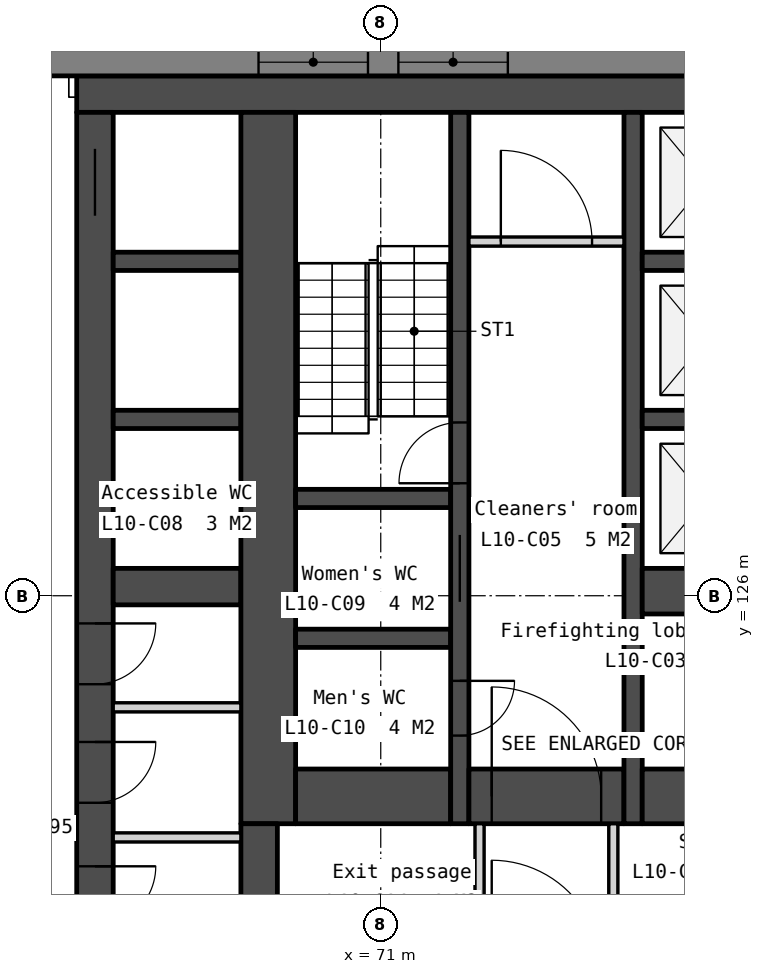
"""IFC4 building model, lengths in metres.
Left out: names, types, materials, properties, quantities, classifications, styles, units other than length and angle.
Written with IfcOpenShell. Run it as: python <this file> out.ifc"""

import sys

from ifc_helpers import new_model, si_unit, direction, frame, frame_2d, origin, place, context, subcontext, project, spatial, polyline, rectangle, outline, extrude, element, fill, save


model = new_model("IFC4")
c1 = context("Model", 3, precision=1e-05, world=origin(), true_north=direction((0.0, 1.0)))
c2 = subcontext(c1, "Body", "Model", "MODEL_VIEW")
j1 = project(units=[si_unit("LENGTHUNIT", "METRE"), si_unit("PLANEANGLEUNIT", "RADIAN")], contexts=[c1])
p1 = place(None, origin())
s1 = spatial("IfcSite", under=j1, at=p1, CompositionType="ELEMENT")
p2 = place(p1, origin())
s2 = spatial("IfcBuilding", under=s1, at=p2, CompositionType="ELEMENT")
p3 = place(p2, frame((0.0, 0.0, 49.0)))
s3 = spatial("IfcBuildingStorey", under=s2, at=p3, CompositionType="ELEMENT", Elevation=49.0)
p4 = place(p3, frame((66.0, 134.25, 0.0), z_axis=(0.0, 0.0, 1.0), x_axis=(1.0, 0.0, 0.0)))
e1 = element("IfcWall", 1, at=p4, inside=s3, PredefinedType="SOLIDWALL", context=c2, shape_type="SweptSolid", body=[
    extrude(rectangle(XDim=28.0, YDim=0.6, at=frame_2d((14.0, 0.0))), origin(), (0.0, 0.0, 1.0), 3.35),
])
p5 = place(p3, frame((66.3, 133.95, 0.0), z_axis=(0.0, 0.0, 1.0), x_axis=(0.0, -1.0, 0.0)))
e2 = element("IfcWall", 2, at=p5, inside=s3, PredefinedType="SOLIDWALL", context=c2, shape_type="SweptSolid", body=[
    extrude(rectangle(XDim=13.8, YDim=0.6, at=frame_2d((6.9, 0.0))), origin(), (0.0, 0.0, 1.0), 3.35),
])
p6 = place(p5, frame((0.6, 0.0, 0.0)))
e3 = element("IfcOpeningElement", 3, at=p6, cuts=e2, PredefinedType="OPENING", context=c2, shape_type="SweptSolid", body=[
    extrude(rectangle(XDim=1.1, YDim=2.1, at=frame_2d((0.55, 1.05))), frame((0.0, 0.31, 0.0), z_axis=(0.0, -1.0, 0.0), x_axis=(1.0, 0.0, 0.0)), (0.0, 0.0, 1.0), 0.62),
])
p7 = place(p5, frame((8.405, 0.0, 0.0)))
e4 = element("IfcOpeningElement", 4, at=p7, cuts=e2, PredefinedType="OPENING", context=c2, shape_type="SweptSolid", body=[
    extrude(rectangle(XDim=1.0, YDim=2.1, at=frame_2d((0.5, 1.05))), frame((0.0, 0.31, 0.0), z_axis=(0.0, -1.0, 0.0), x_axis=(1.0, 0.0, 0.0)), (0.0, 0.0, 1.0), 0.62),
])
p8 = place(p5, frame((10.355, 0.0, 0.0)))
e5 = element("IfcOpeningElement", 5, at=p8, cuts=e2, PredefinedType="OPENING", context=c2, shape_type="SweptSolid", body=[
    extrude(rectangle(XDim=1.0, YDim=2.1, at=frame_2d((0.5, 1.05))), frame((0.0, 0.31, 0.0), z_axis=(0.0, -1.0, 0.0), x_axis=(1.0, 0.0, 0.0)), (0.0, 0.0, 1.0), 0.62),
])
p9 = place(p5, frame((12.4, 0.0, 0.0)))
e6 = element("IfcOpeningElement", 6, at=p9, cuts=e2, PredefinedType="OPENING", context=c2, shape_type="SweptSolid", body=[
    extrude(rectangle(XDim=1.0, YDim=2.1, at=frame_2d((0.5, 1.05))), frame((0.0, 0.31, 0.0), z_axis=(0.0, -1.0, 0.0), x_axis=(1.0, 0.0, 0.0)), (0.0, 0.0, 1.0), 0.62),
])
for number, where, z_axis, x_axis in (
    (7, (66.6, 131.5, 0.0), (0.0, 0.0, 1.0), (1.0, 0.0, 0.0)),
    (8, (66.6, 128.9, 0.0), (0.0, 0.0, 1.0), (1.0, 0.0, 0.0)),
):
    element("IfcWall", number, at=place(p3, frame(where, z_axis=z_axis, x_axis=x_axis)), inside=s3, PredefinedType="SOLIDWALL", context=c2, shape_type="SweptSolid", body=[
        extrude(rectangle(XDim=2.1, YDim=0.3, at=frame_2d((1.05, 0.0))), origin(), (0.0, 0.0, 1.0), 3.35),
    ])
p10 = place(p3, frame((66.6, 126.15, 0.0), z_axis=(0.0, 0.0, 1.0), x_axis=(1.0, 0.0, 0.0)))
e9 = element("IfcWall", 9, at=p10, inside=s3, PredefinedType="SOLIDWALL", context=c2, shape_type="SweptSolid", body=[
    extrude(rectangle(XDim=2.1, YDim=0.6, at=frame_2d((1.05, 0.0))), origin(), (0.0, 0.0, 1.0), 3.35),
])
for number, where, z_axis, x_axis in (
    (10, (66.6, 124.165, 0.0), (0.0, 0.0, 1.0), (1.0, 0.0, 0.0)),
    (11, (66.6, 122.025, 0.0), (0.0, 0.0, 1.0), (1.0, 0.0, 0.0)),
):
    element("IfcWall", number, at=place(p3, frame(where, z_axis=z_axis, x_axis=x_axis)), inside=s3, PredefinedType="PARTITIONING", context=c2, shape_type="SweptSolid", body=[
        extrude(rectangle(XDim=2.1, YDim=0.15, at=frame_2d((1.05, 0.0))), origin(), (0.0, 0.0, 1.0), 3.35),
    ])
p11 = place(p3, frame((69.15, 133.95, 0.0), z_axis=(0.0, 0.0, 1.0), x_axis=(0.0, -1.0, 0.0)))
e12 = element("IfcWall", 12, at=p11, inside=s3, PredefinedType="SOLIDWALL", context=c2, shape_type="SweptSolid", body=[
    extrude(rectangle(XDim=11.7, YDim=0.9, at=frame_2d((5.85, 0.0))), origin(), (0.0, 0.0, 1.0), 3.35),
])
p12 = place(p3, frame((69.0, 122.25, 0.0), z_axis=(0.0, 0.0, 1.0), x_axis=(0.0, -1.0, 0.0)))
e13 = element("IfcWall", 13, at=p12, inside=s3, PredefinedType="SOLIDWALL", context=c2, shape_type="SweptSolid", body=[
    extrude(rectangle(XDim=2.1, YDim=0.6, at=frame_2d((1.05, 0.0))), origin(), (0.0, 0.0, 1.0), 3.35),
])
for number, where, z_axis, x_axis in (
    (14, (69.6, 127.6, 0.0), (0.0, 0.0, 1.0), (1.0, 0.0, 0.0)),
    (15, (69.6, 125.3, 0.0), (0.0, 0.0, 1.0), (1.0, 0.0, 0.0)),
):
    element("IfcWall", number, at=place(p3, frame(where, z_axis=z_axis, x_axis=x_axis)), inside=s3, PredefinedType="SOLIDWALL", context=c2, shape_type="SweptSolid", body=[
        extrude(rectangle(XDim=2.55, YDim=0.3, at=frame_2d((1.275, 0.0))), origin(), (0.0, 0.0, 1.0), 3.35),
    ])
p13 = place(p3, frame((69.6, 122.7, 0.0), z_axis=(0.0, 0.0, 1.0), x_axis=(1.0, 0.0, 0.0)))
e16 = element("IfcWall", 16, at=p13, inside=s3, PredefinedType="SOLIDWALL", context=c2, shape_type="SweptSolid", body=[
    extrude(rectangle(XDim=2.55, YDim=0.9, at=frame_2d((1.275, 0.0))), origin(), (0.0, 0.0, 1.0), 3.35),
])
p14 = place(p3, frame((72.3, 133.95, 0.0), z_axis=(0.0, 0.0, 1.0), x_axis=(0.0, -1.0, 0.0)))
e17 = element("IfcWall", 17, at=p14, inside=s3, PredefinedType="SOLIDWALL", context=c2, shape_type="SweptSolid", body=[
    extrude(rectangle(XDim=11.7, YDim=0.3, at=frame_2d((5.85, 0.0))), origin(), (0.0, 0.0, 1.0), 3.35),
])
p15 = place(p14, frame((6.95, 0.0, 0.0)))
e18 = element("IfcOpeningElement", 18, at=p15, cuts=e17, PredefinedType="OPENING", context=c2, shape_type="SweptSolid", body=[
    extrude(rectangle(XDim=1.1, YDim=2.1, at=frame_2d((0.55, 1.05))), frame((0.0, 0.16, 0.0), z_axis=(0.0, -1.0, 0.0), x_axis=(1.0, 0.0, 0.0)), (0.0, 0.0, 1.0), 0.32),
])
p16 = place(p14, frame((9.35, 0.0, 0.0)))
e19 = element("IfcOpeningElement", 19, at=p16, cuts=e17, PredefinedType="OPENING", context=c2, shape_type="SweptSolid", body=[
    extrude(rectangle(XDim=0.9, YDim=2.1, at=frame_2d((0.45, 1.05))), frame((0.0, 0.16, 0.0), z_axis=(0.0, -1.0, 0.0), x_axis=(1.0, 0.0, 0.0)), (0.0, 0.0, 1.0), 0.32),
])
p17 = place(p14, frame((5.1, 0.0, 0.0)))
e20 = element("IfcOpeningElement", 20, at=p17, cuts=e17, PredefinedType="OPENING", context=c2, shape_type="SweptSolid", body=[
    extrude(rectangle(XDim=1.0, YDim=2.1, at=frame_2d((0.5, 1.05))), frame((0.0, 0.16, 0.0), z_axis=(0.0, -1.0, 0.0), x_axis=(1.0, 0.0, 0.0)), (0.0, 0.0, 1.0), 0.32),
])
p18 = place(p3, frame((72.45, 131.825, 0.0), z_axis=(0.0, 0.0, 1.0), x_axis=(1.0, 0.0, 0.0)))
e21 = element("IfcWall", 21, at=p18, inside=s3, PredefinedType="PARTITIONING", context=c2, shape_type="SweptSolid", body=[
    extrude(rectangle(XDim=2.55, YDim=0.15, at=frame_2d((1.275, 0.0))), origin(), (0.0, 0.0, 1.0), 3.35),
])
p19 = place(p18, frame((0.525, 0.0, 0.0)))
e22 = element("IfcOpeningElement", 22, at=p19, cuts=e21, PredefinedType="OPENING", context=c2, shape_type="SweptSolid", body=[
    extrude(rectangle(XDim=1.5, YDim=2.1, at=frame_2d((0.75, 1.05))), frame((0.0, 0.085, 0.0), z_axis=(0.0, -1.0, 0.0), x_axis=(1.0, 0.0, 0.0)), (0.0, 0.0, 1.0), 0.17),
])
p20 = place(p3, frame((72.45, 122.7, 0.0), z_axis=(0.0, 0.0, 1.0), x_axis=(1.0, 0.0, 0.0)))
e23 = element("IfcWall", 23, at=p20, inside=s3, PredefinedType="SOLIDWALL", context=c2, shape_type="SweptSolid", body=[
    extrude(rectangle(XDim=2.55, YDim=0.9, at=frame_2d((1.275, 0.0))), origin(), (0.0, 0.0, 1.0), 3.35),
])
p21 = place(p20, frame((0.375, 0.0, 0.0)))
e24 = element("IfcOpeningElement", 24, at=p21, cuts=e23, PredefinedType="OPENING", context=c2, shape_type="SweptSolid", body=[
    extrude(rectangle(XDim=1.8, YDim=2.1, at=frame_2d((0.9, 1.05))), frame((0.0, 0.46, 0.0), z_axis=(0.0, -1.0, 0.0), x_axis=(1.0, 0.0, 0.0)), (0.0, 0.0, 1.0), 0.92),
])
for number, where, z_axis, x_axis in (
    (25, (72.625, 122.25, 0.0), (0.0, 0.0, 1.0), (0.0, -1.0, 0.0)),
    (26, (74.825, 122.25, 0.0), (0.0, 0.0, 1.0), (0.0, -1.0, 0.0)),
):
    element("IfcWall", number, at=place(p3, frame(where, z_axis=z_axis, x_axis=x_axis)), inside=s3, PredefinedType="PARTITIONING", context=c2, shape_type="SweptSolid", body=[
        extrude(rectangle(XDim=2.1, YDim=0.15, at=frame_2d((1.05, 0.0))), origin(), (0.0, 0.0, 1.0), 3.35),
    ])
p22 = place(p3, frame((75.15, 133.95, 0.0), z_axis=(0.0, 0.0, 1.0), x_axis=(0.0, -1.0, 0.0)))
e27 = element("IfcWall", 27, at=p22, inside=s3, PredefinedType="SOLIDWALL", context=c2, shape_type="SweptSolid", body=[
    extrude(rectangle(XDim=11.7, YDim=0.3, at=frame_2d((5.85, 0.0))), origin(), (0.0, 0.0, 1.0), 3.35),
])
for number, where, z_axis, x_axis in (
    (28, (75.3, 131.5, 0.0), (0.0, 0.0, 1.0), (1.0, 0.0, 0.0)),
    (29, (75.3, 128.9, 0.0), (0.0, 0.0, 1.0), (1.0, 0.0, 0.0)),
):
    element("IfcWall", number, at=place(p3, frame(where, z_axis=z_axis, x_axis=x_axis)), inside=s3, PredefinedType="SOLIDWALL", context=c2, shape_type="SweptSolid", body=[
        extrude(rectangle(XDim=2.1, YDim=0.3, at=frame_2d((1.05, 0.0))), origin(), (0.0, 0.0, 1.0), 3.35),
    ])
p23 = place(p3, frame((75.3, 126.075, 0.0), z_axis=(0.0, 0.0, 1.0), x_axis=(1.0, 0.0, 0.0)))
e30 = element("IfcWall", 30, at=p23, inside=s3, PredefinedType="SOLIDWALL", context=c2, shape_type="SweptSolid", body=[
    extrude(rectangle(XDim=2.1, YDim=0.75, at=frame_2d((1.05, 0.0))), origin(), (0.0, 0.0, 1.0), 3.35),
])
p24 = place(p3, frame((75.3, 122.7, 0.0), z_axis=(0.0, 0.0, 1.0), x_axis=(1.0, 0.0, 0.0)))
e31 = element("IfcWall", 31, at=p24, inside=s3, PredefinedType="SOLIDWALL", context=c2, shape_type="SweptSolid", body=[
    extrude(rectangle(XDim=6.2, YDim=0.9, at=frame_2d((3.1, 0.0))), origin(), (0.0, 0.0, 1.0), 3.35),
])
p25 = place(p3, frame((102.4, 134.775, -0.15), z_axis=(0.0, 0.0, 1.0), x_axis=(-1.0, 0.0, 0.0)))
e32 = element("IfcWall", 32, at=p25, inside=s3, PredefinedType="SOLIDWALL", context=c2, shape_type="SweptSolid", body=[
    extrude(outline(polyline([(0.0, 0.0), (0.0, 3.5), (38.62, 3.5), (38.62, 0.0), (0.0, 0.0)])), frame((0.0, 0.225, 0.0), z_axis=(0.0, -1.0, 0.0), x_axis=(1.0, 0.0, 0.0)), (0.0, 0.0, 1.0), 0.45),
])
p26 = place(p25, frame((2.43, 0.0, 1.05)))
e33 = element("IfcOpeningElement", 33, at=p26, cuts=e32, PredefinedType="OPENING", context=c2, shape_type="SweptSolid", body=[
    extrude(rectangle(XDim=1.8, YDim=1.5, at=frame_2d((0.9, 0.75))), frame((0.0, 0.235, 0.0), z_axis=(0.0, -1.0, 0.0), x_axis=(1.0, 0.0, 0.0)), (0.0, 0.0, 1.0), 0.47),
])
p27 = place(p25, frame((4.73, 0.0, 1.05)))
e34 = element("IfcOpeningElement", 34, at=p27, cuts=e32, PredefinedType="OPENING", context=c2, shape_type="SweptSolid", body=[
    extrude(rectangle(XDim=1.8, YDim=1.5, at=frame_2d((0.9, 0.75))), frame((0.0, 0.235, 0.0), z_axis=(0.0, -1.0, 0.0), x_axis=(1.0, 0.0, 0.0)), (0.0, 0.0, 1.0), 0.47),
])
p28 = place(p25, frame((11.39, 0.0, 1.05)))
e35 = element("IfcOpeningElement", 35, at=p28, cuts=e32, PredefinedType="OPENING", context=c2, shape_type="SweptSolid", body=[
    extrude(rectangle(XDim=1.8, YDim=1.5, at=frame_2d((0.9, 0.75))), frame((0.0, 0.235, 0.0), z_axis=(0.0, -1.0, 0.0), x_axis=(1.0, 0.0, 0.0)), (0.0, 0.0, 1.0), 0.47),
])
p29 = place(p25, frame((13.69, 0.0, 1.05)))
e36 = element("IfcOpeningElement", 36, at=p29, cuts=e32, PredefinedType="OPENING", context=c2, shape_type="SweptSolid", body=[
    extrude(rectangle(XDim=1.8, YDim=1.5, at=frame_2d((0.9, 0.75))), frame((0.0, 0.235, 0.0), z_axis=(0.0, -1.0, 0.0), x_axis=(1.0, 0.0, 0.0)), (0.0, 0.0, 1.0), 0.47),
])
p30 = place(p25, frame((20.35, 0.0, 1.05)))
e37 = element("IfcOpeningElement", 37, at=p30, cuts=e32, PredefinedType="OPENING", context=c2, shape_type="SweptSolid", body=[
    extrude(rectangle(XDim=1.8, YDim=1.5, at=frame_2d((0.9, 0.75))), frame((0.0, 0.235, 0.0), z_axis=(0.0, -1.0, 0.0), x_axis=(1.0, 0.0, 0.0)), (0.0, 0.0, 1.0), 0.47),
])
p31 = place(p25, frame((22.65, 0.0, 1.05)))
e38 = element("IfcOpeningElement", 38, at=p31, cuts=e32, PredefinedType="OPENING", context=c2, shape_type="SweptSolid", body=[
    extrude(rectangle(XDim=1.8, YDim=1.5, at=frame_2d((0.9, 0.75))), frame((0.0, 0.235, 0.0), z_axis=(0.0, -1.0, 0.0), x_axis=(1.0, 0.0, 0.0)), (0.0, 0.0, 1.0), 0.47),
])
p32 = place(p25, frame((29.31, 0.0, 1.05)))
e39 = element("IfcOpeningElement", 39, at=p32, cuts=e32, PredefinedType="OPENING", context=c2, shape_type="SweptSolid", body=[
    extrude(rectangle(XDim=1.8, YDim=1.5, at=frame_2d((0.9, 0.75))), frame((0.0, 0.235, 0.0), z_axis=(0.0, -1.0, 0.0), x_axis=(1.0, 0.0, 0.0)), (0.0, 0.0, 1.0), 0.47),
])
p33 = place(p25, frame((31.61, 0.0, 1.05)))
e40 = element("IfcOpeningElement", 40, at=p33, cuts=e32, PredefinedType="OPENING", context=c2, shape_type="SweptSolid", body=[
    extrude(rectangle(XDim=1.8, YDim=1.5, at=frame_2d((0.9, 0.75))), frame((0.0, 0.235, 0.0), z_axis=(0.0, -1.0, 0.0), x_axis=(1.0, 0.0, 0.0)), (0.0, 0.0, 1.0), 0.47),
])
p34 = place(p3, frame((54.495, 129.397, -0.15), z_axis=(0.0, 0.0, 1.0), x_axis=(0.499999201451, -0.866025864826, 0.0)))
e41 = element("IfcWall", 41, at=p34, inside=s3, PredefinedType="SOLIDWALL", context=c2, shape_type="SweptSolid", body=[
    extrude(outline(polyline([(44.8, 0.0), (44.8, 3.5), (0.0, 3.5), (0.0, 0.0), (44.8, 0.0)])), frame((0.0, 0.225, 0.0), z_axis=(0.0, -1.0, 0.0), x_axis=(1.0, 0.0, 0.0)), (0.0, 0.0, 1.0), 0.45),
])
p35 = place(p34, frame((2.43, 0.0, 1.05)))
e42 = element("IfcOpeningElement", 42, at=p35, cuts=e41, PredefinedType="OPENING", context=c2, shape_type="SweptSolid", body=[
    extrude(rectangle(XDim=1.8, YDim=1.5, at=frame_2d((0.9, 0.75))), frame((0.0, 0.235, 0.0), z_axis=(0.0, -1.0, 0.0), x_axis=(1.0, 0.0, 0.0)), (0.0, 0.0, 1.0), 0.47),
])
p36 = place(p34, frame((4.73, 0.0, 1.05)))
e43 = element("IfcOpeningElement", 43, at=p36, cuts=e41, PredefinedType="OPENING", context=c2, shape_type="SweptSolid", body=[
    extrude(rectangle(XDim=1.8, YDim=1.5, at=frame_2d((0.9, 0.75))), frame((0.0, 0.235, 0.0), z_axis=(0.0, -1.0, 0.0), x_axis=(1.0, 0.0, 0.0)), (0.0, 0.0, 1.0), 0.47),
])
p37 = place(p34, frame((11.39, 0.0, 1.05)))
e44 = element("IfcOpeningElement", 44, at=p37, cuts=e41, PredefinedType="OPENING", context=c2, shape_type="SweptSolid", body=[
    extrude(rectangle(XDim=1.8, YDim=1.5, at=frame_2d((0.9, 0.75))), frame((0.0, 0.235, 0.0), z_axis=(0.0, -1.0, 0.0), x_axis=(1.0, 0.0, 0.0)), (0.0, 0.0, 1.0), 0.47),
])
p38 = place(p34, frame((13.69, 0.0, 1.05)))
e45 = element("IfcOpeningElement", 45, at=p38, cuts=e41, PredefinedType="OPENING", context=c2, shape_type="SweptSolid", body=[
    extrude(rectangle(XDim=1.8, YDim=1.5, at=frame_2d((0.9, 0.75))), frame((0.0, 0.235, 0.0), z_axis=(0.0, -1.0, 0.0), x_axis=(1.0, 0.0, 0.0)), (0.0, 0.0, 1.0), 0.47),
])
p39 = place(p34, frame((20.35, 0.0, 1.05)))
e46 = element("IfcOpeningElement", 46, at=p39, cuts=e41, PredefinedType="OPENING", context=c2, shape_type="SweptSolid", body=[
    extrude(rectangle(XDim=1.8, YDim=1.5, at=frame_2d((0.9, 0.75))), frame((0.0, 0.235, 0.0), z_axis=(0.0, -1.0, 0.0), x_axis=(1.0, 0.0, 0.0)), (0.0, 0.0, 1.0), 0.47),
])
p40 = place(p34, frame((22.65, 0.0, 1.05)))
e47 = element("IfcOpeningElement", 47, at=p40, cuts=e41, PredefinedType="OPENING", context=c2, shape_type="SweptSolid", body=[
    extrude(rectangle(XDim=1.8, YDim=1.5, at=frame_2d((0.9, 0.75))), frame((0.0, 0.235, 0.0), z_axis=(0.0, -1.0, 0.0), x_axis=(1.0, 0.0, 0.0)), (0.0, 0.0, 1.0), 0.47),
])
p41 = place(p34, frame((29.31, 0.0, 1.05)))
e48 = element("IfcOpeningElement", 48, at=p41, cuts=e41, PredefinedType="OPENING", context=c2, shape_type="SweptSolid", body=[
    extrude(rectangle(XDim=1.8, YDim=1.5, at=frame_2d((0.9, 0.75))), frame((0.0, 0.235, 0.0), z_axis=(0.0, -1.0, 0.0), x_axis=(1.0, 0.0, 0.0)), (0.0, 0.0, 1.0), 0.47),
])
p42 = place(p34, frame((31.61, 0.0, 1.05)))
e49 = element("IfcOpeningElement", 49, at=p42, cuts=e41, PredefinedType="OPENING", context=c2, shape_type="SweptSolid", body=[
    extrude(rectangle(XDim=1.8, YDim=1.5, at=frame_2d((0.9, 0.75))), frame((0.0, 0.235, 0.0), z_axis=(0.0, -1.0, 0.0), x_axis=(1.0, 0.0, 0.0)), (0.0, 0.0, 1.0), 0.47),
])
p43 = place(p34, frame((38.27, 0.0, 1.05)))
e50 = element("IfcOpeningElement", 50, at=p43, cuts=e41, PredefinedType="OPENING", context=c2, shape_type="SweptSolid", body=[
    extrude(rectangle(XDim=1.8, YDim=1.5, at=frame_2d((0.9, 0.75))), frame((0.0, 0.235, 0.0), z_axis=(0.0, -1.0, 0.0), x_axis=(1.0, 0.0, 0.0)), (0.0, 0.0, 1.0), 0.47),
])
p44 = place(p34, frame((40.57, 0.0, 1.05)))
e51 = element("IfcOpeningElement", 51, at=p44, cuts=e41, PredefinedType="OPENING", context=c2, shape_type="SweptSolid", body=[
    extrude(rectangle(XDim=1.8, YDim=1.5, at=frame_2d((0.9, 0.75))), frame((0.0, 0.235, 0.0), z_axis=(0.0, -1.0, 0.0), x_axis=(1.0, 0.0, 0.0)), (0.0, 0.0, 1.0), 0.47),
])
p45 = place(p6, origin())
e52 = element("IfcDoor", 52, at=p45, inside=s3, OperationType="SLIDING_TO_LEFT", PredefinedType="DOOR", context=c2, shape_type="SweptSolid", body=[
    extrude(rectangle(XDim=1.1, YDim=2.1, at=frame_2d((0.55, 1.05))), frame((0.0, 0.025, 0.0), z_axis=(0.0, -1.0, 0.0), x_axis=(1.0, 0.0, 0.0)), (0.0, 0.0, 1.0), 0.05),
])
fill(e3, e52)
p46 = place(p15, origin())
e53 = element("IfcDoor", 53, at=p46, inside=s3, OperationType="SLIDING_TO_LEFT", PredefinedType="DOOR", context=c2, shape_type="SweptSolid", body=[
    extrude(rectangle(XDim=1.1, YDim=2.1, at=frame_2d((0.55, 1.05))), frame((0.0, 0.025, 0.0), z_axis=(0.0, -1.0, 0.0), x_axis=(1.0, 0.0, 0.0)), (0.0, 0.0, 1.0), 0.05),
])
fill(e18, e53)
p47 = place(p21, origin())
e54 = element("IfcDoor", 54, at=p47, inside=s3, OperationType="DOUBLE_DOOR_DOUBLE_SWING", PredefinedType="DOOR", context=c2, shape_type="SweptSolid", body=[
    extrude(rectangle(XDim=1.8, YDim=2.1, at=frame_2d((0.9, 1.05))), frame((0.0, 0.025, 0.0), z_axis=(0.0, -1.0, 0.0), x_axis=(1.0, 0.0, 0.0)), (0.0, 0.0, 1.0), 0.05),
])
fill(e24, e54)
p48 = place(p19, origin())
e55 = element("IfcDoor", 55, at=p48, inside=s3, OperationType="DOUBLE_DOOR_DOUBLE_SWING", PredefinedType="DOOR", context=c2, shape_type="SweptSolid", body=[
    extrude(rectangle(XDim=1.5, YDim=2.1, at=frame_2d((0.75, 1.05))), frame((0.0, 0.025, 0.0), z_axis=(0.0, -1.0, 0.0), x_axis=(1.0, 0.0, 0.0)), (0.0, 0.0, 1.0), 0.05),
])
fill(e22, e55)
p49 = place(p16, origin())
e56 = element("IfcDoor", 56, at=p49, inside=s3, OperationType="SINGLE_SWING_LEFT", PredefinedType="DOOR", context=c2, shape_type="SweptSolid", body=[
    extrude(rectangle(XDim=0.9, YDim=2.1, at=frame_2d((0.45, 1.05))), frame((0.0, 0.025, 0.0), z_axis=(0.0, -1.0, 0.0), x_axis=(1.0, 0.0, 0.0)), (0.0, 0.0, 1.0), 0.05),
])
fill(e19, e56)
p50 = place(p17, origin())
e57 = element("IfcDoor", 57, at=p50, inside=s3, OperationType="SINGLE_SWING_RIGHT", PredefinedType="DOOR", context=c2, shape_type="SweptSolid", body=[
    extrude(rectangle(XDim=1.0, YDim=2.1, at=frame_2d((0.5, 1.05))), frame((0.0, 0.025, 0.0), z_axis=(0.0, -1.0, 0.0), x_axis=(1.0, 0.0, 0.0)), (0.0, 0.0, 1.0), 0.05),
])
fill(e20, e57)
p51 = place(p7, origin())
e58 = element("IfcDoor", 58, at=p51, inside=s3, OperationType="SINGLE_SWING_LEFT", PredefinedType="DOOR", context=c2, shape_type="SweptSolid", body=[
    extrude(rectangle(XDim=1.0, YDim=2.1, at=frame_2d((0.5, 1.05))), frame((0.0, 0.025, 0.0), z_axis=(0.0, -1.0, 0.0), x_axis=(1.0, 0.0, 0.0)), (0.0, 0.0, 1.0), 0.05),
])
fill(e4, e58)
p52 = place(p8, origin())
e59 = element("IfcDoor", 59, at=p52, inside=s3, OperationType="SINGLE_SWING_LEFT", PredefinedType="DOOR", context=c2, shape_type="SweptSolid", body=[
    extrude(rectangle(XDim=1.0, YDim=2.1, at=frame_2d((0.5, 1.05))), frame((0.0, 0.025, 0.0), z_axis=(0.0, -1.0, 0.0), x_axis=(1.0, 0.0, 0.0)), (0.0, 0.0, 1.0), 0.05),
])
fill(e5, e59)
p53 = place(p9, origin())
e60 = element("IfcDoor", 60, at=p53, inside=s3, OperationType="SINGLE_SWING_LEFT", PredefinedType="DOOR", context=c2, shape_type="SweptSolid", body=[
    extrude(rectangle(XDim=1.0, YDim=2.1, at=frame_2d((0.5, 1.05))), frame((0.0, 0.025, 0.0), z_axis=(0.0, -1.0, 0.0), x_axis=(1.0, 0.0, 0.0)), (0.0, 0.0, 1.0), 0.05),
])
fill(e6, e60)
p54 = place(p32, origin())
e61 = element("IfcWindow", 61, at=p54, inside=s3, PartitioningType="SINGLE_PANEL", PredefinedType="WINDOW", context=c2, shape_type="SweptSolid", body=[
    extrude(rectangle(XDim=1.8, YDim=1.5, at=frame_2d((0.9, 0.75))), frame((0.0, 0.03, 0.0), z_axis=(0.0, -1.0, 0.0), x_axis=(1.0, 0.0, 0.0)), (0.0, 0.0, 1.0), 0.06),
])
fill(e39, e61)
p55 = place(p33, origin())
e62 = element("IfcWindow", 62, at=p55, inside=s3, PartitioningType="SINGLE_PANEL", PredefinedType="WINDOW", context=c2, shape_type="SweptSolid", body=[
    extrude(rectangle(XDim=1.8, YDim=1.5, at=frame_2d((0.9, 0.75))), frame((0.0, 0.03, 0.0), z_axis=(0.0, -1.0, 0.0), x_axis=(1.0, 0.0, 0.0)), (0.0, 0.0, 1.0), 0.06),
])
fill(e40, e62)
save(model, sys.argv[1])
